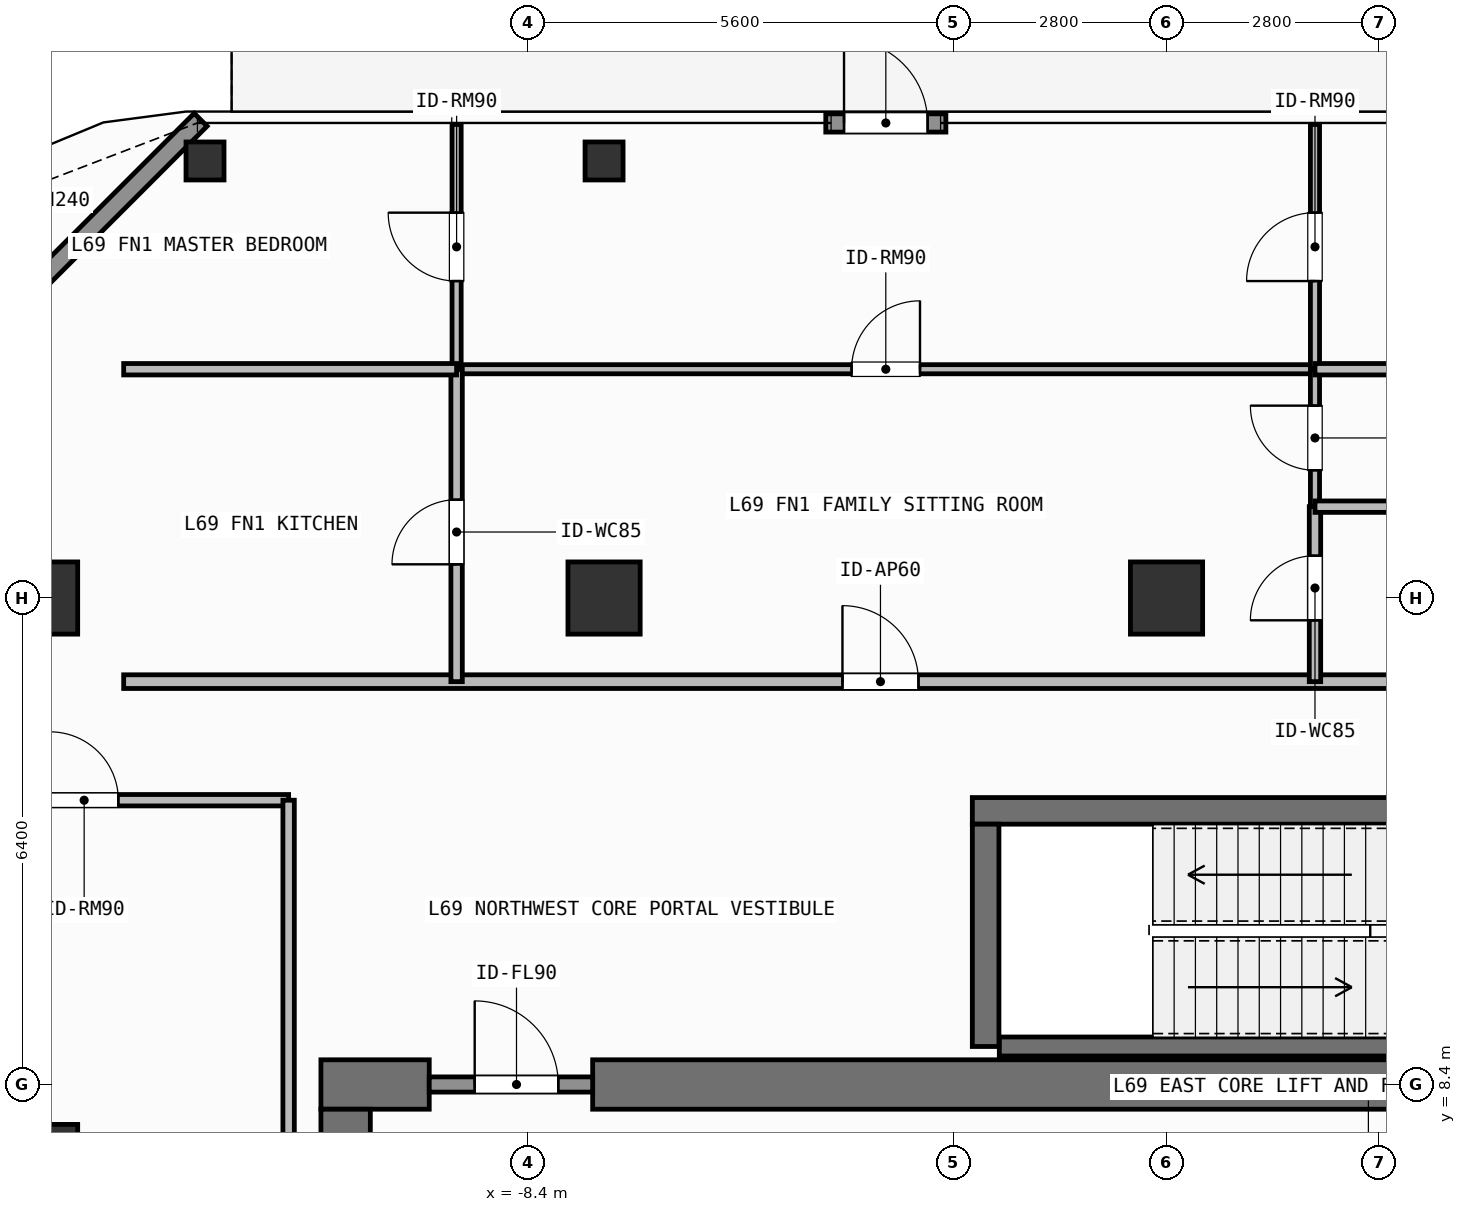
"""IFC4 building model, lengths in metres.
Left out: names, types, materials, properties, quantities, classifications, styles, units other than length and angle.
Written with IfcOpenShell. Run it as: python <this file> out.ifc"""

import sys

from ifc_helpers import new_model, si_unit, direction, frame, frame_2d, origin, origin_2d, place, context, subcontext, project, spatial, rectangle, hollow_rectangle, extrude, element, fill, save


model = new_model("IFC4")
c1 = context("Model", 3, precision=1e-05, world=origin(), true_north=direction((0.0, 1.0)))
c2 = subcontext(c1, "Body", "Model", "MODEL_VIEW")
j1 = project(units=[si_unit("LENGTHUNIT", "METRE"), si_unit("PLANEANGLEUNIT", "RADIAN")], contexts=[c1])
p1 = place(None, origin())
s1 = spatial("IfcSite", under=j1, at=p1, CompositionType="ELEMENT")
p2 = place(p1, origin())
s2 = spatial("IfcBuilding", under=s1, at=p2, CompositionType="ELEMENT")
p3 = place(p2, frame((0.0, 0.0, 282.0)))
s3 = spatial("IfcBuildingStorey", under=s2, at=p3, CompositionType="ELEMENT", Elevation=282.0)
p4 = place(p3, frame((-11.125, 8.4, 0.0), z_axis=(0.0, 0.0, 1.0), x_axis=(1.0, 0.0, 0.0)))
e1 = element("IfcWall", 1, at=p4, inside=s3, PredefinedType="SHEAR", context=c2, shape_type="SweptSolid", body=[
    extrude(rectangle(XDim=1.425, YDim=0.65, at=frame_2d((0.712, 0.0))), origin(), (0.0, 0.0, 1.0), 3.9),
])
p5 = place(p3, frame((-7.55, 8.4, 0.0), z_axis=(0.0, 0.0, 1.0), x_axis=(1.0, 0.0, 0.0)))
e2 = element("IfcWall", 2, at=p5, inside=s3, PredefinedType="SHEAR", context=c2, shape_type="SweptSolid", body=[
    extrude(rectangle(XDim=16.275, YDim=0.65, at=frame_2d((8.138, 0.0))), origin(), (0.0, 0.0, 1.0), 3.9),
])
p6 = place(p3, frame((-10.8, -8.075, 0.0), z_axis=(0.0, 0.0, 1.0), x_axis=(0.0, 1.0, 0.0)))
e3 = element("IfcWall", 3, at=p6, inside=s3, PredefinedType="SHEAR", context=c2, shape_type="SweptSolid", body=[
    extrude(rectangle(XDim=16.15, YDim=0.65, at=frame_2d((8.075, 0.0))), origin(), (0.0, 0.0, 1.0), 3.9),
])
p7 = place(p3, frame((-2.555, 12.0, 0.0), z_axis=(0.0, 0.0, 1.0), x_axis=(1.0, 0.0, 0.0)))
e4 = element("IfcWall", 4, at=p7, inside=s3, PredefinedType="SHEAR", context=c2, shape_type="SweptSolid", body=[
    extrude(rectangle(XDim=7.31, YDim=0.35, at=frame_2d((3.655, 0.0))), origin(), (0.0, 0.0, 1.0), 3.9),
])
p8 = place(p3, frame((-2.2, 8.9, 0.0), z_axis=(0.0, 0.0, 1.0), x_axis=(1.0, 0.0, 0.0)))
e5 = element("IfcWall", 5, at=p8, inside=s3, PredefinedType="SHEAR", context=c2, shape_type="SweptSolid", body=[
    extrude(rectangle(XDim=6.6, YDim=0.25, at=frame_2d((3.3, 0.0))), origin(), (0.0, 0.0, 1.0), 3.9),
])
p9 = place(p3, frame((-2.38, 8.9, 0.0), z_axis=(0.0, 0.0, 1.0), x_axis=(0.0, 1.0, 0.0)))
e6 = element("IfcWall", 6, at=p9, inside=s3, PredefinedType="SHEAR", context=c2, shape_type="SweptSolid", body=[
    extrude(rectangle(XDim=2.925, YDim=0.35, at=frame_2d((1.462, 0.0))), origin(), (0.0, 0.0, 1.0), 3.9),
])
for number, where, z_axis, x_axis in (
    (7, (-14.8, 14.8, 0.0), (0.0, 0.0, 1.0), (1.0, 0.0, 0.0)),
    (8, (-7.4, 14.8, 0.0), (0.0, 0.0, 1.0), (1.0, 0.0, 0.0)),
    (9, (0.0, 14.8, 0.0), (0.0, 0.0, 1.0), (1.0, 0.0, 0.0)),
    (10, (-14.8, 7.4, 0.0), (0.0, 0.0, 1.0), (1.0, 0.0, 0.0)),
):
    element("IfcColumn", number, at=place(p3, frame(where, z_axis=z_axis, x_axis=x_axis)), inside=s3, PredefinedType="COLUMN", context=c2, shape_type="SweptSolid", body=[
        extrude(rectangle(XDim=0.95, YDim=0.95, at=origin_2d()), origin(), (0.0, 0.0, 1.0), 3.9),
    ])
for number, where, z_axis, x_axis in (
    (11, (-12.65, 20.55, 0.0), (0.0, 0.0, 1.0), (1.0, 0.0, 0.0)),
    (12, (-7.4, 20.55, 0.0), (0.0, 0.0, 1.0), (1.0, 0.0, 0.0)),
):
    element("IfcColumn", number, at=place(p3, frame(where, z_axis=z_axis, x_axis=x_axis)), inside=s3, PredefinedType="COLUMN", context=c2, shape_type="SweptSolid", body=[
        extrude(hollow_rectangle(XDim=0.5, YDim=0.5, WallThickness=0.025, at=origin_2d()), origin(), (0.0, 0.0, 1.0), 3.9),
    ])
p10 = place(p3, frame((-4.483, 21.05, 0.0), z_axis=(0.0, 0.0, 1.0), x_axis=(1.0, 0.0, 0.0)))
e13 = element("IfcWall", 13, at=p10, inside=s3, PredefinedType="SOLIDWALL", context=c2, shape_type="SweptSolid", body=[
    extrude(rectangle(XDim=1.58, YDim=0.24, at=frame_2d((0.79, 0.0))), origin(), (0.0, 0.0, 1.0), 3.62),
])
p11 = place(p10, frame((0.24, 0.0, 0.0)))
e14 = element("IfcOpeningElement", 14, at=p11, cuts=e13, PredefinedType="OPENING", context=c2, shape_type="SweptSolid", body=[
    extrude(rectangle(XDim=1.1, YDim=2.2, at=frame_2d((0.55, 1.1))), frame((0.0, 0.13, 0.0), z_axis=(0.0, -1.0, 0.0), x_axis=(1.0, 0.0, 0.0)), (0.0, 0.0, 1.0), 0.26),
])
p12 = place(p3, frame((-16.992, 16.808, 0.0), z_axis=(0.0, 0.0, 1.0), x_axis=(0.707126925818, 0.707086635981, 0.0)))
e15 = element("IfcWall", 15, at=p12, inside=s3, PredefinedType="SOLIDWALL", context=c2, shape_type="SweptSolid", body=[
    extrude(rectangle(XDim=6.06, YDim=0.24, at=frame_2d((3.03, 0.0))), origin(), (0.0, 0.0, 1.0), 3.62),
])
p13 = place(p3, frame((-9.7, 8.4, 0.0), z_axis=(0.0, 0.0, 1.0), x_axis=(1.0, 0.0, 0.0)))
e16 = element("IfcWall", 16, at=p13, inside=s3, PredefinedType="SOLIDWALL", context=c2, shape_type="SweptSolid", body=[
    extrude(rectangle(XDim=2.15, YDim=0.2, at=frame_2d((1.075, 0.0))), origin(), (0.0, 0.0, 1.0), 2.86),
])
p14 = place(p13, frame((0.598, 0.0, 0.0)))
e17 = element("IfcOpeningElement", 17, at=p14, cuts=e16, PredefinedType="OPENING", context=c2, shape_type="SweptSolid", body=[
    extrude(rectangle(XDim=1.1, YDim=2.15, at=frame_2d((0.55, 1.075))), frame((0.0, 0.11, 0.0), z_axis=(0.0, -1.0, 0.0), x_axis=(1.0, 0.0, 0.0)), (0.0, 0.0, 1.0), 0.22),
])
p15 = place(p3, frame((-13.72, 13.7, 0.0), z_axis=(0.0, 0.0, 1.0), x_axis=(1.0, 0.0, 0.0)))
e18 = element("IfcWall", 18, at=p15, inside=s3, PredefinedType="PARTITIONING", context=c2, shape_type="SweptSolid", body=[
    extrude(rectangle(XDim=19.734, YDim=0.18, at=frame_2d((9.867, 0.0))), origin(), (0.0, 0.0, 1.0), 3.62),
])
p16 = place(p15, frame((9.456, 0.0, 0.0)))
e19 = element("IfcOpeningElement", 19, at=p16, cuts=e18, PredefinedType="OPENING", context=c2, shape_type="SweptSolid", body=[
    extrude(rectangle(XDim=1.0, YDim=2.2, at=frame_2d((0.5, 1.1))), frame((0.0, 0.1, 0.0), z_axis=(0.0, -1.0, 0.0), x_axis=(1.0, 0.0, 0.0)), (0.0, 0.0, 1.0), 0.2),
])
p17 = place(p3, frame((-9.34, 17.81, 0.0), z_axis=(0.0, 0.0, 1.0), x_axis=(1.0, 0.0, 0.0)))
e20 = element("IfcWall", 20, at=p17, inside=s3, PredefinedType="PARTITIONING", context=c2, shape_type="SweptSolid", body=[
    extrude(rectangle(XDim=11.293, YDim=0.12, at=frame_2d((5.646, 0.0))), origin(), (0.0, 0.0, 1.0), 3.62),
])
p18 = place(p17, frame((5.197, 0.0, 0.0)))
e21 = element("IfcOpeningElement", 21, at=p18, cuts=e20, PredefinedType="OPENING", context=c2, shape_type="SweptSolid", body=[
    extrude(rectangle(XDim=0.9, YDim=2.1, at=frame_2d((0.45, 1.05))), frame((0.0, 0.07, 0.0), z_axis=(0.0, -1.0, 0.0), x_axis=(1.0, 0.0, 0.0)), (0.0, 0.0, 1.0), 0.14),
])
p19 = place(p3, frame((-9.34, 13.7, 0.0), z_axis=(0.0, 0.0, 1.0), x_axis=(0.0, 1.0, 0.0)))
e22 = element("IfcWall", 22, at=p19, inside=s3, PredefinedType="PARTITIONING", context=c2, shape_type="SweptSolid", body=[
    extrude(rectangle(XDim=4.11, YDim=0.15, at=frame_2d((2.055, 0.0))), origin(), (0.0, 0.0, 1.0), 3.62),
])
p20 = place(p19, frame((1.543, 0.0, 0.0)))
e23 = element("IfcOpeningElement", 23, at=p20, cuts=e22, PredefinedType="OPENING", context=c2, shape_type="SweptSolid", body=[
    extrude(rectangle(XDim=0.85, YDim=2.1, at=frame_2d((0.425, 1.05))), frame((0.0, 0.085, 0.0), z_axis=(0.0, -1.0, 0.0), x_axis=(1.0, 0.0, 0.0)), (0.0, 0.0, 1.0), 0.17),
])
p21 = place(p3, frame((-9.34, 17.81, 0.0), z_axis=(0.0, 0.0, 1.0), x_axis=(0.0, 1.0, 0.0)))
e24 = element("IfcWall", 24, at=p21, inside=s3, PredefinedType="PARTITIONING", context=c2, shape_type="SweptSolid", body=[
    extrude(rectangle(XDim=3.22, YDim=0.12, at=frame_2d((1.61, 0.0))), origin(), (0.0, 0.0, 1.0), 3.62),
])
p22 = place(p21, frame((1.16, 0.0, 0.0)))
e25 = element("IfcOpeningElement", 25, at=p22, cuts=e24, PredefinedType="OPENING", context=c2, shape_type="SweptSolid", body=[
    extrude(rectangle(XDim=0.9, YDim=2.1, at=frame_2d((0.45, 1.05))), frame((0.0, 0.07, 0.0), z_axis=(0.0, -1.0, 0.0), x_axis=(1.0, 0.0, 0.0)), (0.0, 0.0, 1.0), 0.14),
])
p23 = place(p3, frame((1.953, 13.7, 0.0), z_axis=(0.0, 0.0, 1.0), x_axis=(0.0, 1.0, 0.0)))
e26 = element("IfcWall", 26, at=p23, inside=s3, PredefinedType="PARTITIONING", context=c2, shape_type="SweptSolid", body=[
    extrude(rectangle(XDim=2.302, YDim=0.15, at=frame_2d((1.151, 0.0))), origin(), (0.0, 0.0, 1.0), 3.62),
])
p24 = place(p23, frame((0.807, 0.0, 0.0)))
e27 = element("IfcOpeningElement", 27, at=p24, cuts=e26, PredefinedType="OPENING", context=c2, shape_type="SweptSolid", body=[
    extrude(rectangle(XDim=0.85, YDim=2.1, at=frame_2d((0.425, 1.05))), frame((0.0, 0.085, 0.0), z_axis=(0.0, -1.0, 0.0), x_axis=(1.0, 0.0, 0.0)), (0.0, 0.0, 1.0), 0.17),
])
p25 = place(p3, frame((1.953, 16.002, 0.0), z_axis=(0.0, 0.0, 1.0), x_axis=(0.0, 1.0, 0.0)))
e28 = element("IfcWall", 28, at=p25, inside=s3, PredefinedType="PARTITIONING", context=c2, shape_type="SweptSolid", body=[
    extrude(rectangle(XDim=1.808, YDim=0.12, at=frame_2d((0.904, 0.0))), origin(), (0.0, 0.0, 1.0), 3.62),
])
p26 = place(p25, frame((0.479, 0.0, 0.0)))
e29 = element("IfcOpeningElement", 29, at=p26, cuts=e28, PredefinedType="OPENING", context=c2, shape_type="SweptSolid", body=[
    extrude(rectangle(XDim=0.85, YDim=2.1, at=frame_2d((0.425, 1.05))), frame((0.0, 0.07, 0.0), z_axis=(0.0, -1.0, 0.0), x_axis=(1.0, 0.0, 0.0)), (0.0, 0.0, 1.0), 0.14),
])
p27 = place(p3, frame((1.953, 17.81, 0.0), z_axis=(0.0, 0.0, 1.0), x_axis=(0.0, 1.0, 0.0)))
e30 = element("IfcWall", 30, at=p27, inside=s3, PredefinedType="PARTITIONING", context=c2, shape_type="SweptSolid", body=[
    extrude(rectangle(XDim=3.22, YDim=0.12, at=frame_2d((1.61, 0.0))), origin(), (0.0, 0.0, 1.0), 3.62),
])
p28 = place(p27, frame((1.16, 0.0, 0.0)))
e31 = element("IfcOpeningElement", 31, at=p28, cuts=e30, PredefinedType="OPENING", context=c2, shape_type="SweptSolid", body=[
    extrude(rectangle(XDim=0.9, YDim=2.1, at=frame_2d((0.45, 1.05))), frame((0.0, 0.07, 0.0), z_axis=(0.0, -1.0, 0.0), x_axis=(1.0, 0.0, 0.0)), (0.0, 0.0, 1.0), 0.14),
])
p29 = place(p3, frame((-16.93, 12.14, 0.0), z_axis=(0.0, 0.0, 1.0), x_axis=(1.0, 0.0, 0.0)))
e32 = element("IfcWall", 32, at=p29, inside=s3, PredefinedType="PARTITIONING", context=c2, shape_type="SweptSolid", body=[
    extrude(rectangle(XDim=5.38, YDim=0.15, at=frame_2d((2.69, 0.0))), origin(), (0.0, 0.0, 1.0), 3.62),
])
p30 = place(p29, frame((2.24, 0.0, 0.0)))
e33 = element("IfcOpeningElement", 33, at=p30, cuts=e32, PredefinedType="OPENING", context=c2, shape_type="SweptSolid", body=[
    extrude(rectangle(XDim=0.9, YDim=2.1, at=frame_2d((0.45, 1.05))), frame((0.0, 0.085, 0.0), z_axis=(0.0, -1.0, 0.0), x_axis=(1.0, 0.0, 0.0)), (0.0, 0.0, 1.0), 0.17),
])
p31 = place(p3, frame((-13.72, 17.81, 0.0), z_axis=(0.0, 0.0, 1.0), x_axis=(1.0, 0.0, 0.0)))
e34 = element("IfcWall", 34, at=p31, inside=s3, PredefinedType="PARTITIONING", context=c2, shape_type="SweptSolid", body=[
    extrude(rectangle(XDim=4.38, YDim=0.15, at=frame_2d((2.19, 0.0))), origin(), (0.0, 0.0, 1.0), 3.62),
])
for number, where, z_axis, x_axis in (
    (35, (1.953, 16.002, 0.0), (0.0, 0.0, 1.0), (1.0, 0.0, 0.0)),
    (36, (1.953, 17.81, 0.0), (0.0, 0.0, 1.0), (1.0, 0.0, 0.0)),
):
    element("IfcWall", number, at=place(p3, frame(where, z_axis=z_axis, x_axis=x_axis)), inside=s3, PredefinedType="PARTITIONING", context=c2, shape_type="SweptSolid", body=[
        extrude(rectangle(XDim=4.061, YDim=0.15, at=frame_2d((2.031, 0.0))), origin(), (0.0, 0.0, 1.0), 3.62),
    ])
p32 = place(p3, frame((-11.55, 1.8, 0.0), z_axis=(0.0, 0.0, 1.0), x_axis=(0.0, 1.0, 0.0)))
e37 = element("IfcWall", 37, at=p32, inside=s3, PredefinedType="PARTITIONING", context=c2, shape_type="SweptSolid", body=[
    extrude(rectangle(XDim=10.34, YDim=0.15, at=frame_2d((5.17, 0.0))), origin(), (0.0, 0.0, 1.0), 3.62),
])
p33 = place(p11, origin())
e38 = element("IfcDoor", 38, at=p33, inside=s3, OperationType="SINGLE_SWING_LEFT", PredefinedType="DOOR", context=c2, shape_type="SweptSolid", body=[
    extrude(rectangle(XDim=1.1, YDim=2.2, at=frame_2d((0.55, 1.1))), frame((0.0, 0.025, 0.0), z_axis=(0.0, -1.0, 0.0), x_axis=(1.0, 0.0, 0.0)), (0.0, 0.0, 1.0), 0.05),
])
fill(e14, e38)
p34 = place(p14, origin())
e39 = element("IfcDoor", 39, at=p34, inside=s3, OperationType="SINGLE_SWING_LEFT", PredefinedType="DOOR", context=c2, shape_type="SweptSolid", body=[
    extrude(rectangle(XDim=1.1, YDim=2.15, at=frame_2d((0.55, 1.075))), frame((0.0, 0.025, 0.0), z_axis=(0.0, -1.0, 0.0), x_axis=(1.0, 0.0, 0.0)), (0.0, 0.0, 1.0), 0.05),
])
fill(e17, e39)
p35 = place(p16, origin())
e40 = element("IfcDoor", 40, at=p35, inside=s3, OperationType="SINGLE_SWING_LEFT", PredefinedType="DOOR", context=c2, shape_type="SweptSolid", body=[
    extrude(rectangle(XDim=1.0, YDim=2.2, at=frame_2d((0.5, 1.1))), frame((0.0, 0.025, 0.0), z_axis=(0.0, -1.0, 0.0), x_axis=(1.0, 0.0, 0.0)), (0.0, 0.0, 1.0), 0.05),
])
fill(e19, e40)
p36 = place(p18, origin())
e41 = element("IfcDoor", 41, at=p36, inside=s3, OperationType="SINGLE_SWING_RIGHT", PredefinedType="DOOR", context=c2, shape_type="SweptSolid", body=[
    extrude(rectangle(XDim=0.9, YDim=2.1, at=frame_2d((0.45, 1.05))), frame((0.0, 0.025, 0.0), z_axis=(0.0, -1.0, 0.0), x_axis=(1.0, 0.0, 0.0)), (0.0, 0.0, 1.0), 0.05),
])
fill(e21, e41)
p37 = place(p20, origin())
e42 = element("IfcDoor", 42, at=p37, inside=s3, OperationType="SINGLE_SWING_LEFT", PredefinedType="DOOR", context=c2, shape_type="SweptSolid", body=[
    extrude(rectangle(XDim=0.85, YDim=2.1, at=frame_2d((0.425, 1.05))), frame((0.0, 0.025, 0.0), z_axis=(0.0, -1.0, 0.0), x_axis=(1.0, 0.0, 0.0)), (0.0, 0.0, 1.0), 0.05),
])
fill(e23, e42)
p38 = place(p22, origin())
e43 = element("IfcDoor", 43, at=p38, inside=s3, OperationType="SINGLE_SWING_RIGHT", PredefinedType="DOOR", context=c2, shape_type="SweptSolid", body=[
    extrude(rectangle(XDim=0.9, YDim=2.1, at=frame_2d((0.45, 1.05))), frame((0.0, 0.025, 0.0), z_axis=(0.0, -1.0, 0.0), x_axis=(1.0, 0.0, 0.0)), (0.0, 0.0, 1.0), 0.05),
])
fill(e25, e43)
p39 = place(p24, origin())
e44 = element("IfcDoor", 44, at=p39, inside=s3, OperationType="SINGLE_SWING_LEFT", PredefinedType="DOOR", context=c2, shape_type="SweptSolid", body=[
    extrude(rectangle(XDim=0.85, YDim=2.1, at=frame_2d((0.425, 1.05))), frame((0.0, 0.025, 0.0), z_axis=(0.0, -1.0, 0.0), x_axis=(1.0, 0.0, 0.0)), (0.0, 0.0, 1.0), 0.05),
])
fill(e27, e44)
p40 = place(p26, origin())
e45 = element("IfcDoor", 45, at=p40, inside=s3, OperationType="SINGLE_SWING_RIGHT", PredefinedType="DOOR", context=c2, shape_type="SweptSolid", body=[
    extrude(rectangle(XDim=0.85, YDim=2.1, at=frame_2d((0.425, 1.05))), frame((0.0, 0.025, 0.0), z_axis=(0.0, -1.0, 0.0), x_axis=(1.0, 0.0, 0.0)), (0.0, 0.0, 1.0), 0.05),
])
fill(e29, e45)
p41 = place(p28, origin())
e46 = element("IfcDoor", 46, at=p41, inside=s3, OperationType="SINGLE_SWING_LEFT", PredefinedType="DOOR", context=c2, shape_type="SweptSolid", body=[
    extrude(rectangle(XDim=0.9, YDim=2.1, at=frame_2d((0.45, 1.05))), frame((0.0, 0.025, 0.0), z_axis=(0.0, -1.0, 0.0), x_axis=(1.0, 0.0, 0.0)), (0.0, 0.0, 1.0), 0.05),
])
fill(e31, e46)
p42 = place(p30, origin())
e47 = element("IfcDoor", 47, at=p42, inside=s3, OperationType="SINGLE_SWING_LEFT", PredefinedType="DOOR", context=c2, shape_type="SweptSolid", body=[
    extrude(rectangle(XDim=0.9, YDim=2.1, at=frame_2d((0.45, 1.05))), frame((0.0, 0.025, 0.0), z_axis=(0.0, -1.0, 0.0), x_axis=(1.0, 0.0, 0.0)), (0.0, 0.0, 1.0), 0.05),
])
fill(e33, e47)
save(model, sys.argv[1])
